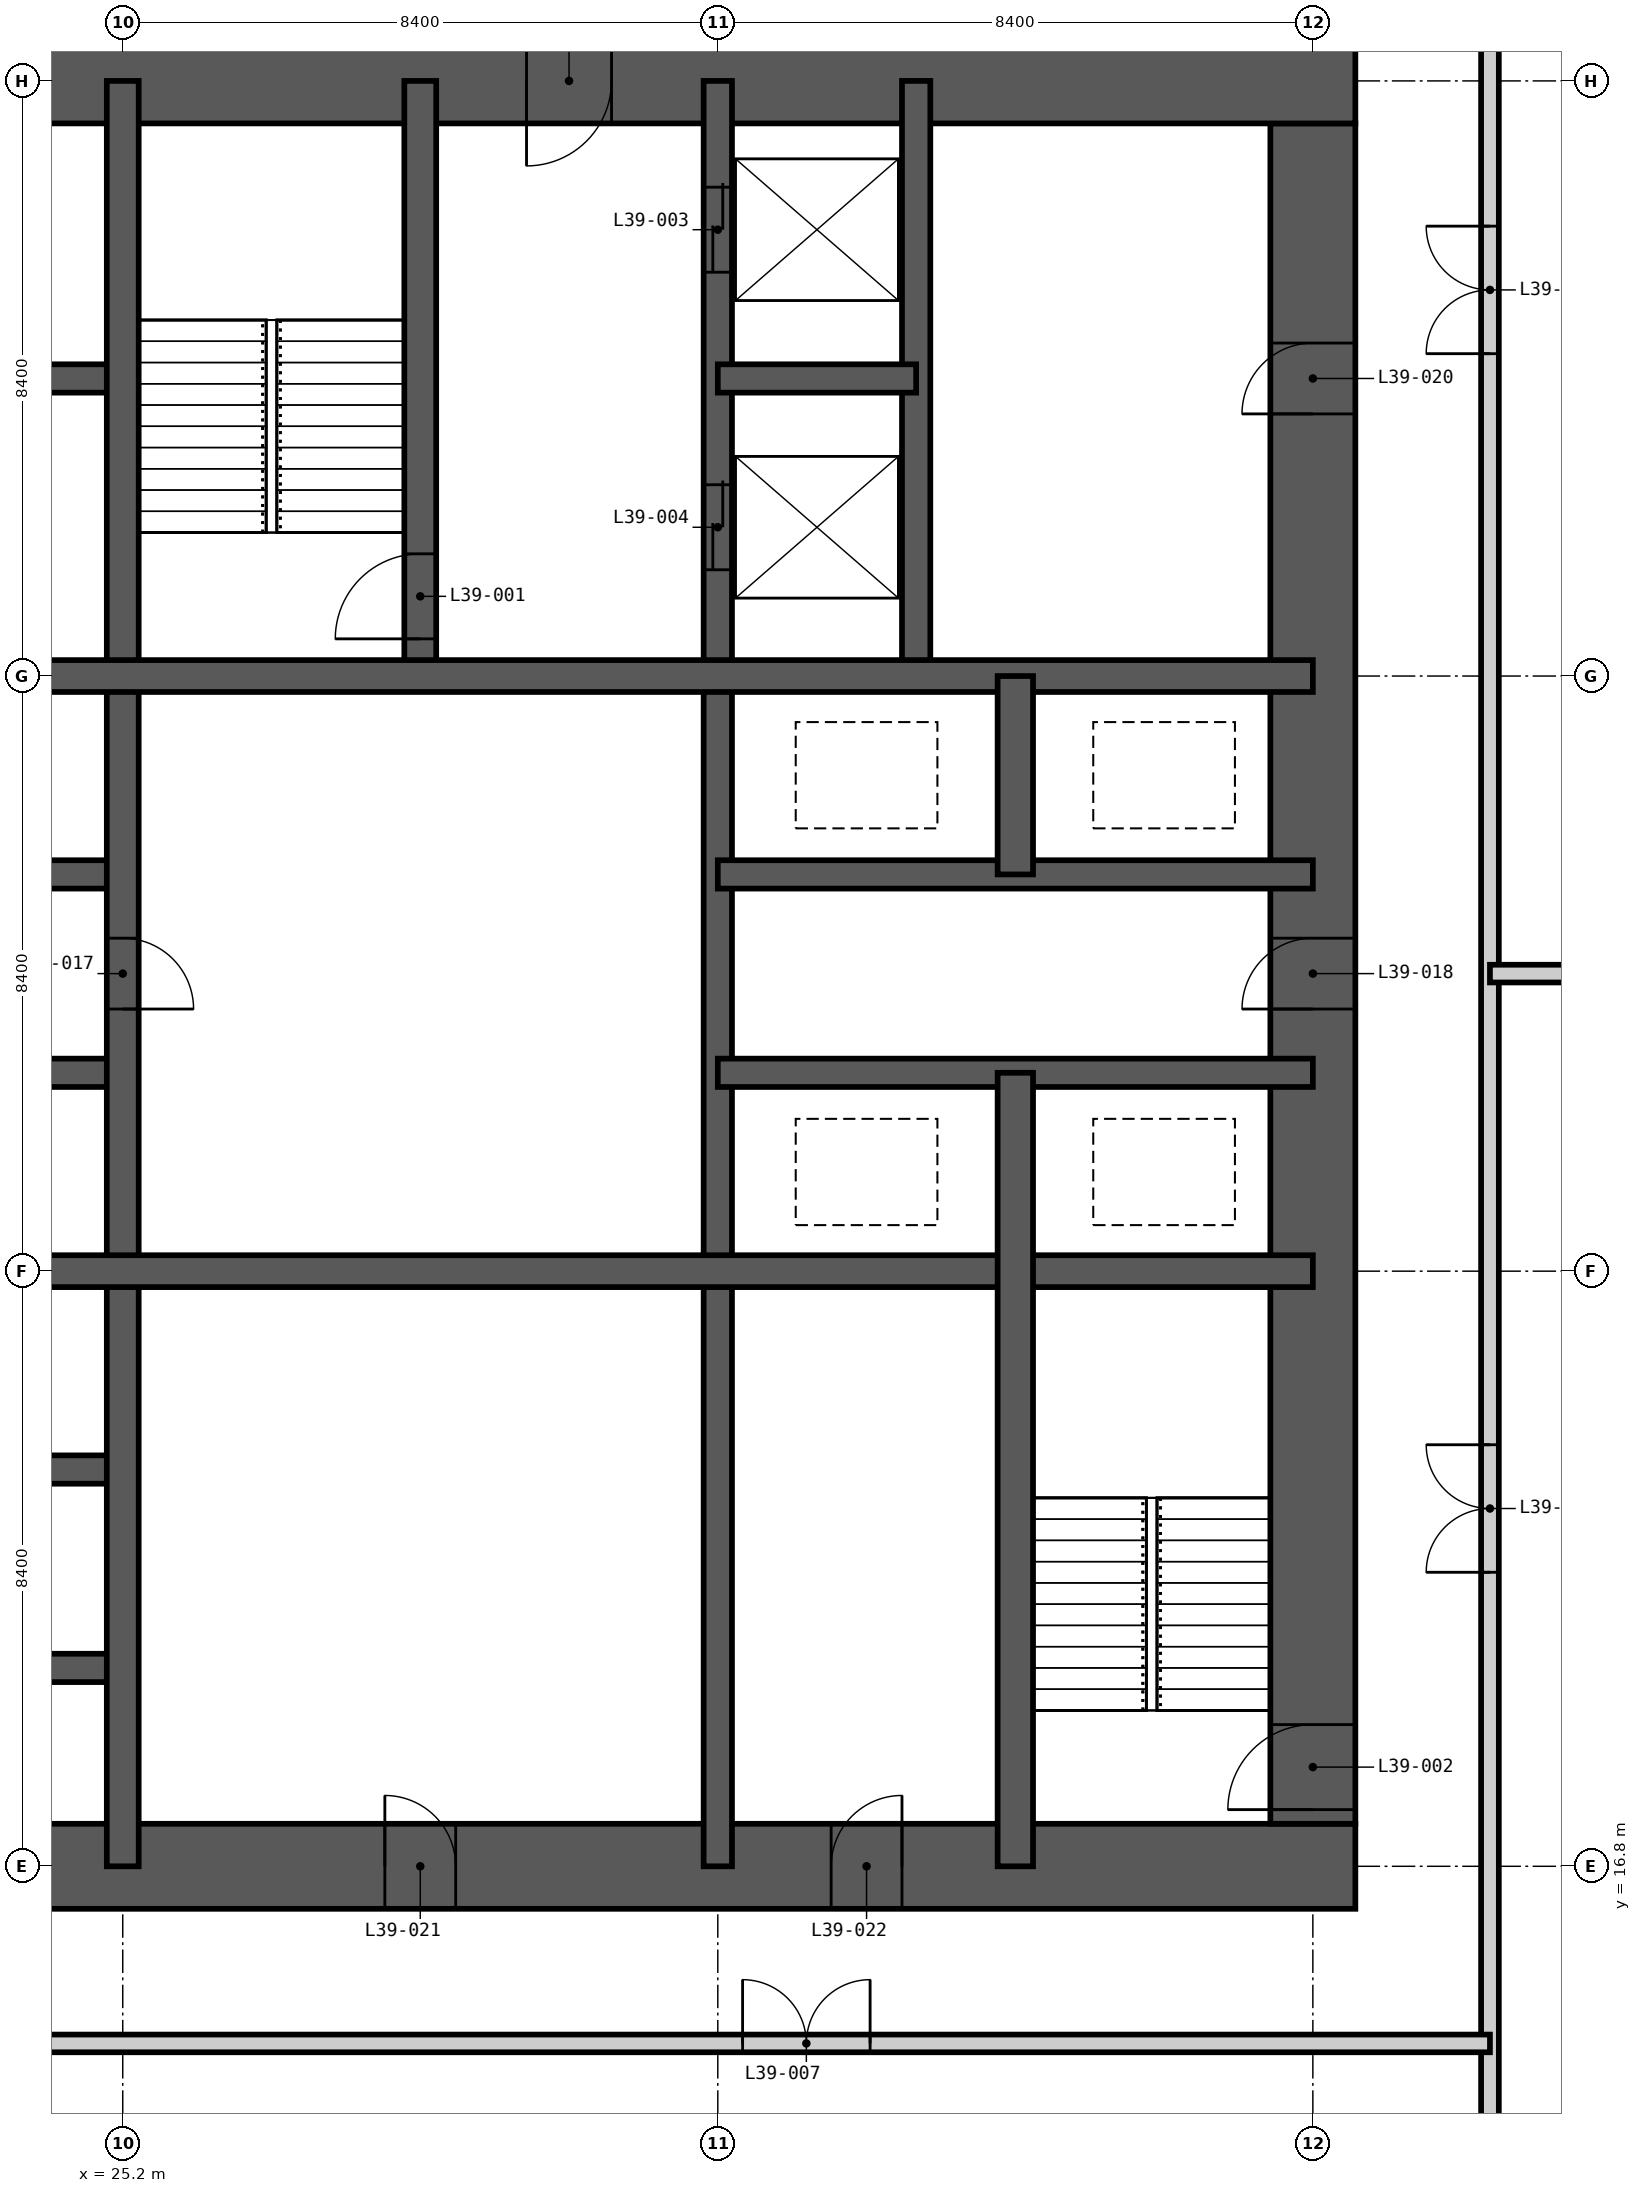
"""IFC4 building model, lengths in metres.
Left out: names, types, materials, properties, quantities, classifications, styles, units other than length and angle.
Written with IfcOpenShell. Run it as: python <this file> out.ifc"""

import sys

from ifc_helpers import new_model, si_unit, direction, frame, frame_2d, origin, place, context, subcontext, project, spatial, rectangle, extrude, element, fill, save


model = new_model("IFC4")
c1 = context("Model", 3, precision=1e-05, world=origin(), true_north=direction((0.0, 1.0)))
c2 = subcontext(c1, "Body", "Model", "MODEL_VIEW")
j1 = project(units=[si_unit("LENGTHUNIT", "METRE"), si_unit("PLANEANGLEUNIT", "RADIAN")], contexts=[c1])
p1 = place(None, origin())
s1 = spatial("IfcSite", under=j1, at=p1, CompositionType="ELEMENT")
p2 = place(p1, origin())
s2 = spatial("IfcBuilding", under=s1, at=p2, CompositionType="ELEMENT")
p3 = place(p2, frame((0.0, 0.0, 153.6)))
s3 = spatial("IfcBuildingStorey", under=s2, at=p3, CompositionType="ELEMENT", Elevation=153.6)
p4 = place(p3, frame((16.2, 16.8, -0.4), z_axis=(0.0, 0.0, 1.0), x_axis=(1.0, 0.0, 0.0)))
e1 = element("IfcWall", 1, at=p4, inside=s3, PredefinedType="SHEAR", context=c2, shape_type="SweptSolid", body=[
    extrude(rectangle(XDim=26.4, YDim=1.2, at=frame_2d((13.2, 0.0))), origin(), (0.0, 0.0, 1.0), 5.45),
])
p5 = place(p4, frame((12.7, 0.0, 0.4)))
e2 = element("IfcOpeningElement", 2, at=p5, cuts=e1, PredefinedType="OPENING", context=c2, shape_type="SweptSolid", body=[
    extrude(rectangle(XDim=1.0, YDim=2.1, at=frame_2d((0.5, 1.05))), frame((0.0, 0.61, 0.0), z_axis=(0.0, -1.0, 0.0), x_axis=(1.0, 0.0, 0.0)), (0.0, 0.0, 1.0), 1.22),
])
p6 = place(p4, frame((19.0, 0.0, 0.4)))
e3 = element("IfcOpeningElement", 3, at=p6, cuts=e1, PredefinedType="OPENING", context=c2, shape_type="SweptSolid", body=[
    extrude(rectangle(XDim=1.0, YDim=2.1, at=frame_2d((0.5, 1.05))), frame((0.0, 0.61, 0.0), z_axis=(0.0, -1.0, 0.0), x_axis=(1.0, 0.0, 0.0)), (0.0, 0.0, 1.0), 1.22),
])
p7 = place(p3, frame((42.0, 17.4, -0.4), z_axis=(0.0, 0.0, 1.0), x_axis=(0.0, 1.0, 0.0)))
e4 = element("IfcWall", 4, at=p7, inside=s3, PredefinedType="SHEAR", context=c2, shape_type="SweptSolid", body=[
    extrude(rectangle(XDim=24.0, YDim=1.2, at=frame_2d((12.0, 0.0))), origin(), (0.0, 0.0, 1.0), 5.45),
])
p8 = place(p7, frame((0.2, 0.0, 0.4)))
e5 = element("IfcOpeningElement", 5, at=p8, cuts=e4, PredefinedType="OPENING", context=c2, shape_type="SweptSolid", body=[
    extrude(rectangle(XDim=1.2, YDim=2.2, at=frame_2d((0.6, 1.1))), frame((0.0, 0.61, 0.0), z_axis=(0.0, -1.0, 0.0), x_axis=(1.0, 0.0, 0.0)), (0.0, 0.0, 1.0), 1.22),
])
p9 = place(p7, frame((11.5, 0.0, 0.4)))
e6 = element("IfcOpeningElement", 6, at=p9, cuts=e4, PredefinedType="OPENING", context=c2, shape_type="SweptSolid", body=[
    extrude(rectangle(XDim=1.0, YDim=2.1, at=frame_2d((0.5, 1.05))), frame((0.0, 0.61, 0.0), z_axis=(0.0, -1.0, 0.0), x_axis=(1.0, 0.0, 0.0)), (0.0, 0.0, 1.0), 1.22),
])
p10 = place(p7, frame((19.9, 0.0, 0.4)))
e7 = element("IfcOpeningElement", 7, at=p10, cuts=e4, PredefinedType="OPENING", context=c2, shape_type="SweptSolid", body=[
    extrude(rectangle(XDim=1.0, YDim=2.1, at=frame_2d((0.5, 1.05))), frame((0.0, 0.61, 0.0), z_axis=(0.0, -1.0, 0.0), x_axis=(1.0, 0.0, 0.0)), (0.0, 0.0, 1.0), 1.22),
])
p11 = place(p3, frame((42.6, 42.0, -0.4), z_axis=(0.0, 0.0, 1.0), x_axis=(-1.0, 0.0, 0.0)))
e8 = element("IfcWall", 8, at=p11, inside=s3, PredefinedType="SHEAR", context=c2, shape_type="SweptSolid", body=[
    extrude(rectangle(XDim=26.4, YDim=1.2, at=frame_2d((13.2, 0.0))), origin(), (0.0, 0.0, 1.0), 5.45),
])
p12 = place(p11, frame((21.1, 0.0, 0.4)))
e9 = element("IfcOpeningElement", 9, at=p12, cuts=e8, PredefinedType="OPENING", context=c2, shape_type="SweptSolid", body=[
    extrude(rectangle(XDim=1.0, YDim=2.1, at=frame_2d((0.5, 1.05))), frame((0.0, 0.61, 0.0), z_axis=(0.0, -1.0, 0.0), x_axis=(1.0, 0.0, 0.0)), (0.0, 0.0, 1.0), 1.22),
])
p13 = place(p11, frame((10.5, 0.0, 0.4)))
e10 = element("IfcOpeningElement", 10, at=p13, cuts=e8, PredefinedType="OPENING", context=c2, shape_type="SweptSolid", body=[
    extrude(rectangle(XDim=1.2, YDim=2.2, at=frame_2d((0.6, 1.1))), frame((0.0, 0.61, 0.0), z_axis=(0.0, -1.0, 0.0), x_axis=(1.0, 0.0, 0.0)), (0.0, 0.0, 1.0), 1.22),
])
p14 = place(p3, frame((33.6, 16.8, -0.4), z_axis=(0.0, 0.0, 1.0), x_axis=(0.0, 1.0, 0.0)))
e11 = element("IfcWall", 11, at=p14, inside=s3, PredefinedType="SHEAR", context=c2, shape_type="SweptSolid", body=[
    extrude(rectangle(XDim=25.2, YDim=0.4, at=frame_2d((12.6, 0.0))), origin(), (0.0, 0.0, 1.0), 5.45),
])
p15 = place(p14, frame((22.5, 0.0, 0.4)))
e12 = element("IfcOpeningElement", 12, at=p15, cuts=e11, PredefinedType="OPENING", context=c2, shape_type="SweptSolid", body=[
    extrude(rectangle(XDim=1.2, YDim=2.2, at=frame_2d((0.6, 1.1))), frame((0.0, 0.21, 0.0), z_axis=(0.0, -1.0, 0.0), x_axis=(1.0, 0.0, 0.0)), (0.0, 0.0, 1.0), 0.42),
])
p16 = place(p14, frame((18.3, 0.0, 0.4)))
e13 = element("IfcOpeningElement", 13, at=p16, cuts=e11, PredefinedType="OPENING", context=c2, shape_type="SweptSolid", body=[
    extrude(rectangle(XDim=1.2, YDim=2.2, at=frame_2d((0.6, 1.1))), frame((0.0, 0.21, 0.0), z_axis=(0.0, -1.0, 0.0), x_axis=(1.0, 0.0, 0.0)), (0.0, 0.0, 1.0), 0.42),
])
for number, where, z_axis, x_axis in (
    (14, (36.4, 33.6, -0.4), (0.0, 0.0, 1.0), (0.0, 1.0, 0.0)),
    (15, (16.8, 19.6, -0.4), (0.0, 0.0, 1.0), (1.0, 0.0, 0.0)),
    (16, (16.8, 22.4, -0.4), (0.0, 0.0, 1.0), (1.0, 0.0, 0.0)),
    (17, (16.8, 28.0, -0.4), (0.0, 0.0, 1.0), (1.0, 0.0, 0.0)),
    (18, (33.6, 28.0, -0.4), (0.0, 0.0, 1.0), (1.0, 0.0, 0.0)),
    (19, (16.8, 30.8, -0.4), (0.0, 0.0, 1.0), (1.0, 0.0, 0.0)),
    (20, (33.6, 30.8, -0.4), (0.0, 0.0, 1.0), (1.0, 0.0, 0.0)),
    (21, (16.8, 37.8, -0.4), (0.0, 0.0, 1.0), (1.0, 0.0, 0.0)),
):
    element("IfcWall", number, at=place(p3, frame(where, z_axis=z_axis, x_axis=x_axis)), inside=s3, PredefinedType="SHEAR", context=c2, shape_type="SweptSolid", body=[
        extrude(rectangle(XDim=8.4, YDim=0.4, at=frame_2d((4.2, 0.0))), origin(), (0.0, 0.0, 1.0), 5.45),
    ])
p17 = place(p3, frame((33.6, 37.8, -0.4), z_axis=(0.0, 0.0, 1.0), x_axis=(1.0, 0.0, 0.0)))
e22 = element("IfcWall", 22, at=p17, inside=s3, PredefinedType="SHEAR", context=c2, shape_type="SweptSolid", body=[
    extrude(rectangle(XDim=2.8, YDim=0.4, at=frame_2d((1.4, 0.0))), origin(), (0.0, 0.0, 1.0), 5.45),
])
p18 = place(p3, frame((25.2, 16.8, -0.4), z_axis=(0.0, 0.0, 1.0), x_axis=(0.0, 1.0, 0.0)))
e23 = element("IfcWall", 23, at=p18, inside=s3, PredefinedType="SHEAR", context=c2, shape_type="SweptSolid", body=[
    extrude(rectangle(XDim=25.2, YDim=0.45, at=frame_2d((12.6, 0.0))), origin(), (0.0, 0.0, 1.0), 5.45),
])
p19 = place(p18, frame((12.1, 0.0, 0.4)))
e24 = element("IfcOpeningElement", 24, at=p19, cuts=e23, PredefinedType="OPENING", context=c2, shape_type="SweptSolid", body=[
    extrude(rectangle(XDim=1.0, YDim=2.1, at=frame_2d((0.5, 1.05))), frame((0.0, 0.235, 0.0), z_axis=(0.0, -1.0, 0.0), x_axis=(1.0, 0.0, 0.0)), (0.0, 0.0, 1.0), 0.47),
])
p20 = place(p3, frame((29.4, 33.6, -0.4), z_axis=(0.0, 0.0, 1.0), x_axis=(0.0, 1.0, 0.0)))
e25 = element("IfcWall", 25, at=p20, inside=s3, PredefinedType="SHEAR", context=c2, shape_type="SweptSolid", body=[
    extrude(rectangle(XDim=8.4, YDim=0.45, at=frame_2d((4.2, 0.0))), origin(), (0.0, 0.0, 1.0), 5.45),
])
p21 = place(p20, frame((0.525, 0.0, 0.4)))
e26 = element("IfcOpeningElement", 26, at=p21, cuts=e25, PredefinedType="OPENING", context=c2, shape_type="SweptSolid", body=[
    extrude(rectangle(XDim=1.2, YDim=2.2, at=frame_2d((0.6, 1.1))), frame((0.0, 0.235, 0.0), z_axis=(0.0, -1.0, 0.0), x_axis=(1.0, 0.0, 0.0)), (0.0, 0.0, 1.0), 0.47),
])
for number, where, z_axis, x_axis in (
    (27, (16.8, 25.2, -0.4), (0.0, 0.0, 1.0), (1.0, 0.0, 0.0)),
    (28, (16.8, 33.6, -0.4), (0.0, 0.0, 1.0), (1.0, 0.0, 0.0)),
):
    element("IfcWall", number, at=place(p3, frame(where, z_axis=z_axis, x_axis=x_axis)), inside=s3, PredefinedType="SHEAR", context=c2, shape_type="SweptSolid", body=[
        extrude(rectangle(XDim=25.2, YDim=0.45, at=frame_2d((12.6, 0.0))), origin(), (0.0, 0.0, 1.0), 5.45),
    ])
p22 = place(p3, frame((37.8, 16.8, -0.4), z_axis=(0.0, 0.0, 1.0), x_axis=(0.0, 1.0, 0.0)))
e29 = element("IfcWall", 29, at=p22, inside=s3, PredefinedType="SHEAR", context=c2, shape_type="SweptSolid", body=[
    extrude(rectangle(XDim=11.2, YDim=0.5, at=frame_2d((5.6, 0.0))), origin(), (0.0, 0.0, 1.0), 5.45),
])
p23 = place(p3, frame((37.8, 30.8, -0.4), z_axis=(0.0, 0.0, 1.0), x_axis=(0.0, 1.0, 0.0)))
e30 = element("IfcWall", 30, at=p23, inside=s3, PredefinedType="SHEAR", context=c2, shape_type="SweptSolid", body=[
    extrude(rectangle(XDim=2.8, YDim=0.5, at=frame_2d((1.4, 0.0))), origin(), (0.0, 0.0, 1.0), 5.45),
])
p24 = place(p3, frame((44.5, -0.018, 0.0), z_axis=(0.0, 0.0, 1.0), x_axis=(0.0, 1.0, 0.0)))
e31 = element("IfcWall", 31, at=p24, inside=s3, PredefinedType="PARTITIONING", context=c2, shape_type="SweptSolid", body=[
    extrude(rectangle(XDim=54.636, YDim=0.25, at=frame_2d((27.318, 0.0))), origin(), (0.0, 0.0, 1.0), 5.05),
])
p25 = place(p24, frame((20.968, 0.0, 0.0)))
e32 = element("IfcOpeningElement", 32, at=p25, cuts=e31, PredefinedType="OPENING", context=c2, shape_type="SweptSolid", body=[
    extrude(rectangle(XDim=1.8, YDim=2.4, at=frame_2d((0.9, 1.2))), frame((0.0, 0.135, 0.0), z_axis=(0.0, -1.0, 0.0), x_axis=(1.0, 0.0, 0.0)), (0.0, 0.0, 1.0), 0.27),
])
p26 = place(p24, frame((38.168, 0.0, 0.0)))
e33 = element("IfcOpeningElement", 33, at=p26, cuts=e31, PredefinedType="OPENING", context=c2, shape_type="SweptSolid", body=[
    extrude(rectangle(XDim=1.8, YDim=2.4, at=frame_2d((0.9, 1.2))), frame((0.0, 0.135, 0.0), z_axis=(0.0, -1.0, 0.0), x_axis=(1.0, 0.0, 0.0)), (0.0, 0.0, 1.0), 0.27),
])
p27 = place(p3, frame((14.3, 14.3, 0.0), z_axis=(0.0, 0.0, 1.0), x_axis=(1.0, 0.0, 0.0)))
e34 = element("IfcWall", 34, at=p27, inside=s3, PredefinedType="PARTITIONING", context=c2, shape_type="SweptSolid", body=[
    extrude(rectangle(XDim=30.2, YDim=0.25, at=frame_2d((15.1, 0.0))), origin(), (0.0, 0.0, 1.0), 5.05),
])
p28 = place(p27, frame((19.65, 0.0, 0.0)))
e35 = element("IfcOpeningElement", 35, at=p28, cuts=e34, PredefinedType="OPENING", context=c2, shape_type="SweptSolid", body=[
    extrude(rectangle(XDim=1.8, YDim=2.4, at=frame_2d((0.9, 1.2))), frame((0.0, 0.135, 0.0), z_axis=(0.0, -1.0, 0.0), x_axis=(1.0, 0.0, 0.0)), (0.0, 0.0, 1.0), 0.27),
])
p29 = place(p27, frame((4.55, 0.0, 0.0)))
e36 = element("IfcOpeningElement", 36, at=p29, cuts=e34, PredefinedType="OPENING", context=c2, shape_type="SweptSolid", body=[
    extrude(rectangle(XDim=1.8, YDim=2.4, at=frame_2d((0.9, 1.2))), frame((0.0, 0.135, 0.0), z_axis=(0.0, -1.0, 0.0), x_axis=(1.0, 0.0, 0.0)), (0.0, 0.0, 1.0), 0.27),
])
p30 = place(p3, frame((44.5, 29.4, 0.0), z_axis=(0.0, 0.0, 1.0), x_axis=(1.0, 0.0, 0.0)))
e37 = element("IfcWall", 37, at=p30, inside=s3, PredefinedType="PARTITIONING", context=c2, shape_type="SweptSolid", body=[
    extrude(rectangle(XDim=10.118, YDim=0.25, at=frame_2d((5.059, 0.0))), origin(), (0.0, 0.0, 1.0), 5.05),
])
p31 = place(p21, origin())
e38 = element("IfcDoor", 38, at=p31, inside=s3, OperationType="SINGLE_SWING_LEFT", PredefinedType="DOOR", context=c2, shape_type="SweptSolid", body=[
    extrude(rectangle(XDim=1.2, YDim=2.2, at=frame_2d((0.6, 1.1))), frame((0.0, 0.025, 0.0), z_axis=(0.0, -1.0, 0.0), x_axis=(1.0, 0.0, 0.0)), (0.0, 0.0, 1.0), 0.05),
])
fill(e26, e38)
p32 = place(p8, origin())
e39 = element("IfcDoor", 39, at=p32, inside=s3, OperationType="SINGLE_SWING_LEFT", PredefinedType="DOOR", context=c2, shape_type="SweptSolid", body=[
    extrude(rectangle(XDim=1.2, YDim=2.2, at=frame_2d((0.6, 1.1))), frame((0.0, 0.025, 0.0), z_axis=(0.0, -1.0, 0.0), x_axis=(1.0, 0.0, 0.0)), (0.0, 0.0, 1.0), 0.05),
])
fill(e5, e39)
p33 = place(p15, origin())
e40 = element("IfcDoor", 40, at=p33, inside=s3, OperationType="DOUBLE_DOOR_SLIDING", PredefinedType="DOOR", context=c2, shape_type="SweptSolid", body=[
    extrude(rectangle(XDim=1.2, YDim=2.2, at=frame_2d((0.6, 1.1))), frame((0.0, 0.025, 0.0), z_axis=(0.0, -1.0, 0.0), x_axis=(1.0, 0.0, 0.0)), (0.0, 0.0, 1.0), 0.05),
])
fill(e12, e40)
p34 = place(p16, origin())
e41 = element("IfcDoor", 41, at=p34, inside=s3, OperationType="DOUBLE_DOOR_SLIDING", PredefinedType="DOOR", context=c2, shape_type="SweptSolid", body=[
    extrude(rectangle(XDim=1.2, YDim=2.2, at=frame_2d((0.6, 1.1))), frame((0.0, 0.025, 0.0), z_axis=(0.0, -1.0, 0.0), x_axis=(1.0, 0.0, 0.0)), (0.0, 0.0, 1.0), 0.05),
])
fill(e13, e41)
p35 = place(p28, origin())
e42 = element("IfcDoor", 42, at=p35, inside=s3, OperationType="DOUBLE_DOOR_DOUBLE_SWING", PredefinedType="DOOR", context=c2, shape_type="SweptSolid", body=[
    extrude(rectangle(XDim=1.8, YDim=2.4, at=frame_2d((0.9, 1.2))), frame((0.0, 0.025, 0.0), z_axis=(0.0, -1.0, 0.0), x_axis=(1.0, 0.0, 0.0)), (0.0, 0.0, 1.0), 0.05),
])
fill(e35, e42)
p36 = place(p25, origin())
e43 = element("IfcDoor", 43, at=p36, inside=s3, OperationType="DOUBLE_DOOR_DOUBLE_SWING", PredefinedType="DOOR", context=c2, shape_type="SweptSolid", body=[
    extrude(rectangle(XDim=1.8, YDim=2.4, at=frame_2d((0.9, 1.2))), frame((0.0, 0.025, 0.0), z_axis=(0.0, -1.0, 0.0), x_axis=(1.0, 0.0, 0.0)), (0.0, 0.0, 1.0), 0.05),
])
fill(e32, e43)
p37 = place(p26, origin())
e44 = element("IfcDoor", 44, at=p37, inside=s3, OperationType="DOUBLE_DOOR_DOUBLE_SWING", PredefinedType="DOOR", context=c2, shape_type="SweptSolid", body=[
    extrude(rectangle(XDim=1.8, YDim=2.4, at=frame_2d((0.9, 1.2))), frame((0.0, 0.025, 0.0), z_axis=(0.0, -1.0, 0.0), x_axis=(1.0, 0.0, 0.0)), (0.0, 0.0, 1.0), 0.05),
])
fill(e33, e44)
p38 = place(p19, frame((1.0, 0.0, 0.0), z_axis=(0.0, 0.0, 1.0), x_axis=(-1.0, 0.0, 0.0)))
e45 = element("IfcDoor", 45, at=p38, inside=s3, OperationType="SINGLE_SWING_RIGHT", PredefinedType="DOOR", context=c2, shape_type="SweptSolid", body=[
    extrude(rectangle(XDim=1.0, YDim=2.1, at=frame_2d((0.5, 1.05))), frame((0.0, 0.025, 0.0), z_axis=(0.0, -1.0, 0.0), x_axis=(1.0, 0.0, 0.0)), (0.0, 0.0, 1.0), 0.05),
])
fill(e24, e45)
p39 = place(p9, origin())
e46 = element("IfcDoor", 46, at=p39, inside=s3, OperationType="SINGLE_SWING_LEFT", PredefinedType="DOOR", context=c2, shape_type="SweptSolid", body=[
    extrude(rectangle(XDim=1.0, YDim=2.1, at=frame_2d((0.5, 1.05))), frame((0.0, 0.025, 0.0), z_axis=(0.0, -1.0, 0.0), x_axis=(1.0, 0.0, 0.0)), (0.0, 0.0, 1.0), 0.05),
])
fill(e6, e46)
p40 = place(p13, origin())
e47 = element("IfcDoor", 47, at=p40, inside=s3, OperationType="SINGLE_SWING_RIGHT", PredefinedType="DOOR", context=c2, shape_type="SweptSolid", body=[
    extrude(rectangle(XDim=1.2, YDim=2.2, at=frame_2d((0.6, 1.1))), frame((0.0, 0.025, 0.0), z_axis=(0.0, -1.0, 0.0), x_axis=(1.0, 0.0, 0.0)), (0.0, 0.0, 1.0), 0.05),
])
fill(e10, e47)
p41 = place(p10, origin())
e48 = element("IfcDoor", 48, at=p41, inside=s3, OperationType="SINGLE_SWING_LEFT", PredefinedType="DOOR", context=c2, shape_type="SweptSolid", body=[
    extrude(rectangle(XDim=1.0, YDim=2.1, at=frame_2d((0.5, 1.05))), frame((0.0, 0.025, 0.0), z_axis=(0.0, -1.0, 0.0), x_axis=(1.0, 0.0, 0.0)), (0.0, 0.0, 1.0), 0.05),
])
fill(e7, e48)
p42 = place(p5, origin())
e49 = element("IfcDoor", 49, at=p42, inside=s3, OperationType="SINGLE_SWING_LEFT", PredefinedType="DOOR", context=c2, shape_type="SweptSolid", body=[
    extrude(rectangle(XDim=1.0, YDim=2.1, at=frame_2d((0.5, 1.05))), frame((0.0, 0.025, 0.0), z_axis=(0.0, -1.0, 0.0), x_axis=(1.0, 0.0, 0.0)), (0.0, 0.0, 1.0), 0.05),
])
fill(e2, e49)
p43 = place(p6, origin())
e50 = element("IfcDoor", 50, at=p43, inside=s3, OperationType="SINGLE_SWING_RIGHT", PredefinedType="DOOR", context=c2, shape_type="SweptSolid", body=[
    extrude(rectangle(XDim=1.0, YDim=2.1, at=frame_2d((0.5, 1.05))), frame((0.0, 0.025, 0.0), z_axis=(0.0, -1.0, 0.0), x_axis=(1.0, 0.0, 0.0)), (0.0, 0.0, 1.0), 0.05),
])
fill(e3, e50)
save(model, sys.argv[1])
